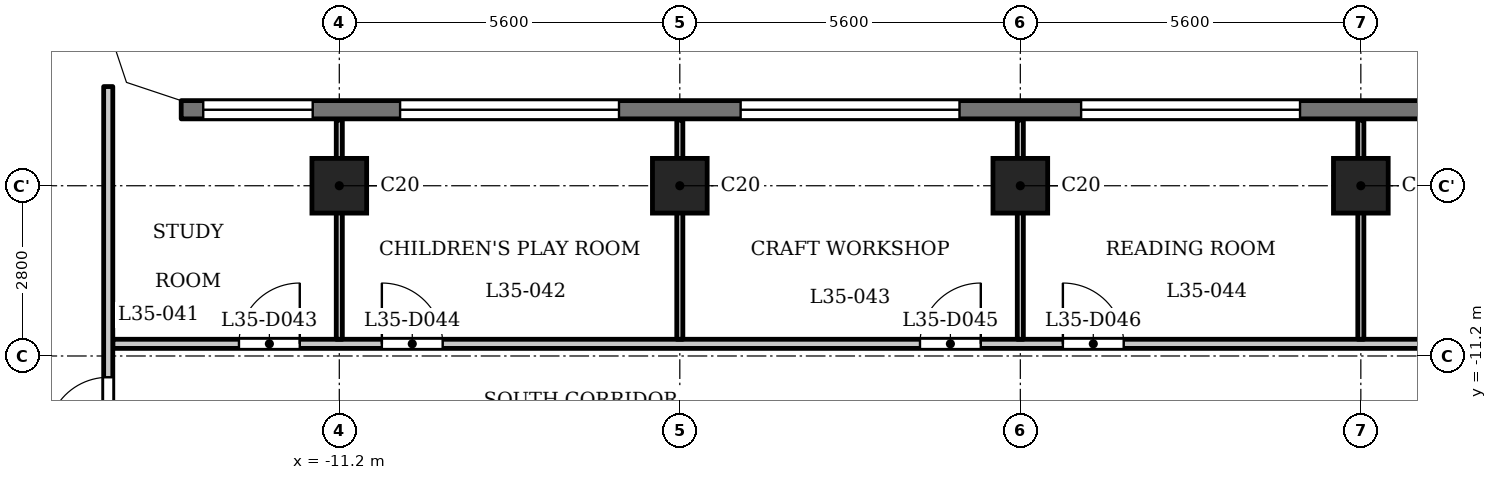
"""IFC4 building model, lengths in metres.
Left out: names, types, materials, properties, quantities, classifications, styles, units other than length and angle.
Written with IfcOpenShell. Run it as: python <this file> out.ifc"""

import sys

from ifc_helpers import new_model, si_unit, direction, frame, frame_2d, origin, origin_2d, place, context, subcontext, project, spatial, polyline, rectangle, outline, extrude, element, fill, save


model = new_model("IFC4")
c1 = context("Model", 3, precision=1e-05, world=origin(), true_north=direction((0.0, 1.0)))
c2 = subcontext(c1, "Body", "Model", "MODEL_VIEW")
j1 = project(units=[si_unit("LENGTHUNIT", "METRE"), si_unit("PLANEANGLEUNIT", "RADIAN")], contexts=[c1])
p1 = place(None, origin())
s1 = spatial("IfcSite", under=j1, at=p1, CompositionType="ELEMENT")
p2 = place(p1, origin())
s2 = spatial("IfcBuilding", under=s1, at=p2, CompositionType="ELEMENT")
p3 = place(p2, frame((0.0, 0.0, 139.6)))
s3 = spatial("IfcBuildingStorey", under=s2, at=p3, CompositionType="ELEMENT", Elevation=139.6)
for number, where, z_axis, x_axis in (
    (1, (-11.2, -8.4, 0.0), (0.0, 0.0, 1.0), (1.0, 0.0, 0.0)),
    (2, (-5.6, -8.4, 0.0), (0.0, 0.0, 1.0), (1.0, 0.0, 0.0)),
    (3, (0.0, -8.4, 0.0), (0.0, 0.0, 1.0), (1.0, 0.0, 0.0)),
    (4, (5.6, -8.4, 0.0), (0.0, 0.0, 1.0), (1.0, 0.0, 0.0)),
):
    element("IfcColumn", number, at=place(p3, frame(where, z_axis=z_axis, x_axis=x_axis)), inside=s3, PredefinedType="COLUMN", context=c2, shape_type="SweptSolid", body=[
        extrude(rectangle(XDim=0.9, YDim=0.9, at=origin_2d()), origin(), (0.0, 0.0, 1.0), 3.5),
    ])
p4 = place(p3, frame((13.8, -7.15, 0.0), z_axis=(0.0, 0.0, 1.0), x_axis=(-1.0, 0.0, 0.0)))
e5 = element("IfcWall", 5, at=p4, inside=s3, PredefinedType="SOLIDWALL", context=c2, shape_type="SweptSolid", body=[
    extrude(rectangle(XDim=27.6, YDim=0.3, at=frame_2d((13.8, 0.0))), origin(), (0.0, 0.0, 1.0), 3.2),
])
p5 = place(p4, frame((0.363, 0.0, 0.9)))
e6 = element("IfcOpeningElement", 6, at=p5, cuts=e5, PredefinedType="OPENING", context=c2, shape_type="SweptSolid", body=[
    extrude(rectangle(XDim=1.8, YDim=1.25, at=frame_2d((0.9, 0.625))), frame((0.0, 0.16, 0.0), z_axis=(0.0, -1.0, 0.0), x_axis=(1.0, 0.0, 0.0)), (0.0, 0.0, 1.0), 0.32),
])
p6 = place(p4, frame((3.6, 0.0, 1.2)))
e7 = element("IfcOpeningElement", 7, at=p6, cuts=e5, PredefinedType="OPENING", context=c2, shape_type="SweptSolid", body=[
    extrude(rectangle(XDim=3.6, YDim=0.95, at=frame_2d((1.8, 0.475))), frame((0.0, 0.16, 0.0), z_axis=(0.0, -1.0, 0.0), x_axis=(1.0, 0.0, 0.0)), (0.0, 0.0, 1.0), 0.32),
])
p7 = place(p4, frame((9.2, 0.0, 1.2)))
e8 = element("IfcOpeningElement", 8, at=p7, cuts=e5, PredefinedType="OPENING", context=c2, shape_type="SweptSolid", body=[
    extrude(rectangle(XDim=3.6, YDim=0.95, at=frame_2d((1.8, 0.475))), frame((0.0, 0.16, 0.0), z_axis=(0.0, -1.0, 0.0), x_axis=(1.0, 0.0, 0.0)), (0.0, 0.0, 1.0), 0.32),
])
p8 = place(p4, frame((14.8, 0.0, 1.2)))
e9 = element("IfcOpeningElement", 9, at=p8, cuts=e5, PredefinedType="OPENING", context=c2, shape_type="SweptSolid", body=[
    extrude(rectangle(XDim=3.6, YDim=0.95, at=frame_2d((1.8, 0.475))), frame((0.0, 0.16, 0.0), z_axis=(0.0, -1.0, 0.0), x_axis=(1.0, 0.0, 0.0)), (0.0, 0.0, 1.0), 0.32),
])
p9 = place(p4, frame((20.4, 0.0, 1.2)))
e10 = element("IfcOpeningElement", 10, at=p9, cuts=e5, PredefinedType="OPENING", context=c2, shape_type="SweptSolid", body=[
    extrude(rectangle(XDim=3.6, YDim=0.95, at=frame_2d((1.8, 0.475))), frame((0.0, 0.16, 0.0), z_axis=(0.0, -1.0, 0.0), x_axis=(1.0, 0.0, 0.0)), (0.0, 0.0, 1.0), 0.32),
])
p10 = place(p4, frame((25.438, 0.0, 0.9)))
e11 = element("IfcOpeningElement", 11, at=p10, cuts=e5, PredefinedType="OPENING", context=c2, shape_type="SweptSolid", body=[
    extrude(rectangle(XDim=1.8, YDim=1.25, at=frame_2d((0.9, 0.625))), frame((0.0, 0.16, 0.0), z_axis=(0.0, -1.0, 0.0), x_axis=(1.0, 0.0, 0.0)), (0.0, 0.0, 1.0), 0.32),
])
p11 = place(p3, frame((-14.925, -11.0, 0.0), z_axis=(0.0, 0.0, 1.0), x_axis=(1.0, 0.0, 0.0)))
e12 = element("IfcWall", 12, at=p11, inside=s3, PredefinedType="PARTITIONING", context=c2, shape_type="SweptSolid", body=[
    extrude(rectangle(XDim=29.85, YDim=0.15, at=frame_2d((14.925, 0.0))), origin(), (0.0, 0.0, 1.0), 3.2),
])
p12 = place(p11, frame((2.075, 0.0, 0.0)))
e13 = element("IfcOpeningElement", 13, at=p12, cuts=e12, PredefinedType="OPENING", context=c2, shape_type="SweptSolid", body=[
    extrude(rectangle(XDim=1.0, YDim=2.1, at=frame_2d((0.5, 1.05))), frame((0.0, 0.085, 0.0), z_axis=(0.0, -1.0, 0.0), x_axis=(1.0, 0.0, 0.0)), (0.0, 0.0, 1.0), 0.17),
])
p13 = place(p11, frame((4.425, 0.0, 0.0)))
e14 = element("IfcOpeningElement", 14, at=p13, cuts=e12, PredefinedType="OPENING", context=c2, shape_type="SweptSolid", body=[
    extrude(rectangle(XDim=1.0, YDim=2.1, at=frame_2d((0.5, 1.05))), frame((0.0, 0.085, 0.0), z_axis=(0.0, -1.0, 0.0), x_axis=(1.0, 0.0, 0.0)), (0.0, 0.0, 1.0), 0.17),
])
p14 = place(p11, frame((13.275, 0.0, 0.0)))
e15 = element("IfcOpeningElement", 15, at=p14, cuts=e12, PredefinedType="OPENING", context=c2, shape_type="SweptSolid", body=[
    extrude(rectangle(XDim=1.0, YDim=2.1, at=frame_2d((0.5, 1.05))), frame((0.0, 0.085, 0.0), z_axis=(0.0, -1.0, 0.0), x_axis=(1.0, 0.0, 0.0)), (0.0, 0.0, 1.0), 0.17),
])
p15 = place(p11, frame((15.625, 0.0, 0.0)))
e16 = element("IfcOpeningElement", 16, at=p15, cuts=e12, PredefinedType="OPENING", context=c2, shape_type="SweptSolid", body=[
    extrude(rectangle(XDim=1.0, YDim=2.1, at=frame_2d((0.5, 1.05))), frame((0.0, 0.085, 0.0), z_axis=(0.0, -1.0, 0.0), x_axis=(1.0, 0.0, 0.0)), (0.0, 0.0, 1.0), 0.17),
])
p16 = place(p11, frame((24.475, 0.0, 0.0)))
e17 = element("IfcOpeningElement", 17, at=p16, cuts=e12, PredefinedType="OPENING", context=c2, shape_type="SweptSolid", body=[
    extrude(rectangle(XDim=1.0, YDim=2.1, at=frame_2d((0.5, 1.05))), frame((0.0, 0.085, 0.0), z_axis=(0.0, -1.0, 0.0), x_axis=(1.0, 0.0, 0.0)), (0.0, 0.0, 1.0), 0.17),
])
p17 = place(p11, frame((26.774, 0.0, 0.0)))
e18 = element("IfcOpeningElement", 18, at=p17, cuts=e12, PredefinedType="OPENING", context=c2, shape_type="SweptSolid", body=[
    extrude(rectangle(XDim=1.0, YDim=2.1, at=frame_2d((0.5, 1.05))), frame((0.0, 0.085, 0.0), z_axis=(0.0, -1.0, 0.0), x_axis=(1.0, 0.0, 0.0)), (0.0, 0.0, 1.0), 0.17),
])
p18 = place(p3, frame((-15.0, -13.125, 0.0), z_axis=(0.0, 0.0, 1.0), x_axis=(0.0, 1.0, 0.0)))
e19 = element("IfcWall", 19, at=p18, inside=s3, PredefinedType="PARTITIONING", context=c2, shape_type="SweptSolid", body=[
    extrude(rectangle(XDim=6.356, YDim=0.15, at=frame_2d((3.178, 0.0))), origin(), (0.0, 0.0, 1.0), 3.2),
])
p19 = place(p18, frame((0.575, 0.0, 0.0)))
e20 = element("IfcOpeningElement", 20, at=p19, cuts=e19, PredefinedType="OPENING", context=c2, shape_type="SweptSolid", body=[
    extrude(rectangle(XDim=1.0, YDim=2.1, at=frame_2d((0.5, 1.05))), frame((0.0, 0.085, 0.0), z_axis=(0.0, -1.0, 0.0), x_axis=(1.0, 0.0, 0.0)), (0.0, 0.0, 1.0), 0.17),
])
for number, where, z_axis, x_axis in (
    (21, (-11.2, -10.925, 0.0), (0.0, 0.0, 1.0), (0.0, 1.0, 0.0)),
    (22, (-5.6, -10.925, 0.0), (0.0, 0.0, 1.0), (0.0, 1.0, 0.0)),
    (23, (0.0, -10.925, 0.0), (0.0, 0.0, 1.0), (0.0, 1.0, 0.0)),
    (24, (5.6, -10.925, 0.0), (0.0, 0.0, 1.0), (0.0, 1.0, 0.0)),
):
    element("IfcWall", number, at=place(p3, frame(where, z_axis=z_axis, x_axis=x_axis)), inside=s3, PredefinedType="PARTITIONING", context=c2, shape_type="SweptSolid", body=[
        extrude(rectangle(XDim=3.605, YDim=0.1, at=frame_2d((1.802, 0.0))), origin(), (0.0, 0.0, 1.0), 3.2),
    ])
p20 = place(p3, origin())
e25 = element("IfcWall", 25, at=p20, inside=s3, PredefinedType="SOLIDWALL", context=c2, shape_type="SweptSolid", body=[
    extrude(outline(polyline([(-14.937, -6.937), (-13.849, -7.3), (-13.8, -7.3), (-13.8, -7.0), (-14.7, -6.7), (-15.0, -5.8), (-15.3, -5.8), (-15.3, -5.849), (-14.937, -6.937)])), origin(), (0.0, 0.0, 1.0), 3.2),
])
p21 = place(p19, origin())
e26 = element("IfcDoor", 26, at=p21, inside=s3, OperationType="SINGLE_SWING_RIGHT", PredefinedType="DOOR", context=c2, shape_type="SweptSolid", body=[
    extrude(rectangle(XDim=1.0, YDim=2.1, at=frame_2d((0.5, 1.05))), frame((0.0, 0.025, 0.0), z_axis=(0.0, -1.0, 0.0), x_axis=(1.0, 0.0, 0.0)), (0.0, 0.0, 1.0), 0.05),
])
fill(e20, e26)
p22 = place(p12, origin())
e27 = element("IfcDoor", 27, at=p22, inside=s3, OperationType="SINGLE_SWING_LEFT", PredefinedType="DOOR", context=c2, shape_type="SweptSolid", body=[
    extrude(rectangle(XDim=1.0, YDim=2.1, at=frame_2d((0.5, 1.05))), frame((0.0, 0.025, 0.0), z_axis=(0.0, -1.0, 0.0), x_axis=(1.0, 0.0, 0.0)), (0.0, 0.0, 1.0), 0.05),
])
fill(e13, e27)
p23 = place(p13, origin())
e28 = element("IfcDoor", 28, at=p23, inside=s3, OperationType="SINGLE_SWING_RIGHT", PredefinedType="DOOR", context=c2, shape_type="SweptSolid", body=[
    extrude(rectangle(XDim=1.0, YDim=2.1, at=frame_2d((0.5, 1.05))), frame((0.0, 0.025, 0.0), z_axis=(0.0, -1.0, 0.0), x_axis=(1.0, 0.0, 0.0)), (0.0, 0.0, 1.0), 0.05),
])
fill(e14, e28)
p24 = place(p14, origin())
e29 = element("IfcDoor", 29, at=p24, inside=s3, OperationType="SINGLE_SWING_LEFT", PredefinedType="DOOR", context=c2, shape_type="SweptSolid", body=[
    extrude(rectangle(XDim=1.0, YDim=2.1, at=frame_2d((0.5, 1.05))), frame((0.0, 0.025, 0.0), z_axis=(0.0, -1.0, 0.0), x_axis=(1.0, 0.0, 0.0)), (0.0, 0.0, 1.0), 0.05),
])
fill(e15, e29)
p25 = place(p15, origin())
e30 = element("IfcDoor", 30, at=p25, inside=s3, OperationType="SINGLE_SWING_RIGHT", PredefinedType="DOOR", context=c2, shape_type="SweptSolid", body=[
    extrude(rectangle(XDim=1.0, YDim=2.1, at=frame_2d((0.5, 1.05))), frame((0.0, 0.025, 0.0), z_axis=(0.0, -1.0, 0.0), x_axis=(1.0, 0.0, 0.0)), (0.0, 0.0, 1.0), 0.05),
])
fill(e16, e30)
p26 = place(p7, origin())
e31 = element("IfcWindow", 31, at=p26, inside=s3, PartitioningType="SINGLE_PANEL", PredefinedType="WINDOW", context=c2, shape_type="SweptSolid", body=[
    extrude(rectangle(XDim=3.6, YDim=0.95, at=frame_2d((1.8, 0.475))), frame((0.0, 0.03, 0.0), z_axis=(0.0, -1.0, 0.0), x_axis=(1.0, 0.0, 0.0)), (0.0, 0.0, 1.0), 0.06),
])
fill(e8, e31)
p27 = place(p8, origin())
e32 = element("IfcWindow", 32, at=p27, inside=s3, PartitioningType="SINGLE_PANEL", PredefinedType="WINDOW", context=c2, shape_type="SweptSolid", body=[
    extrude(rectangle(XDim=3.6, YDim=0.95, at=frame_2d((1.8, 0.475))), frame((0.0, 0.03, 0.0), z_axis=(0.0, -1.0, 0.0), x_axis=(1.0, 0.0, 0.0)), (0.0, 0.0, 1.0), 0.06),
])
fill(e9, e32)
p28 = place(p9, origin())
e33 = element("IfcWindow", 33, at=p28, inside=s3, PartitioningType="SINGLE_PANEL", PredefinedType="WINDOW", context=c2, shape_type="SweptSolid", body=[
    extrude(rectangle(XDim=3.6, YDim=0.95, at=frame_2d((1.8, 0.475))), frame((0.0, 0.03, 0.0), z_axis=(0.0, -1.0, 0.0), x_axis=(1.0, 0.0, 0.0)), (0.0, 0.0, 1.0), 0.06),
])
fill(e10, e33)
p29 = place(p10, origin())
e34 = element("IfcWindow", 34, at=p29, inside=s3, PartitioningType="SINGLE_PANEL", PredefinedType="WINDOW", context=c2, shape_type="SweptSolid", body=[
    extrude(rectangle(XDim=1.8, YDim=1.25, at=frame_2d((0.9, 0.625))), frame((0.0, 0.03, 0.0), z_axis=(0.0, -1.0, 0.0), x_axis=(1.0, 0.0, 0.0)), (0.0, 0.0, 1.0), 0.06),
])
fill(e11, e34)
save(model, sys.argv[1])
